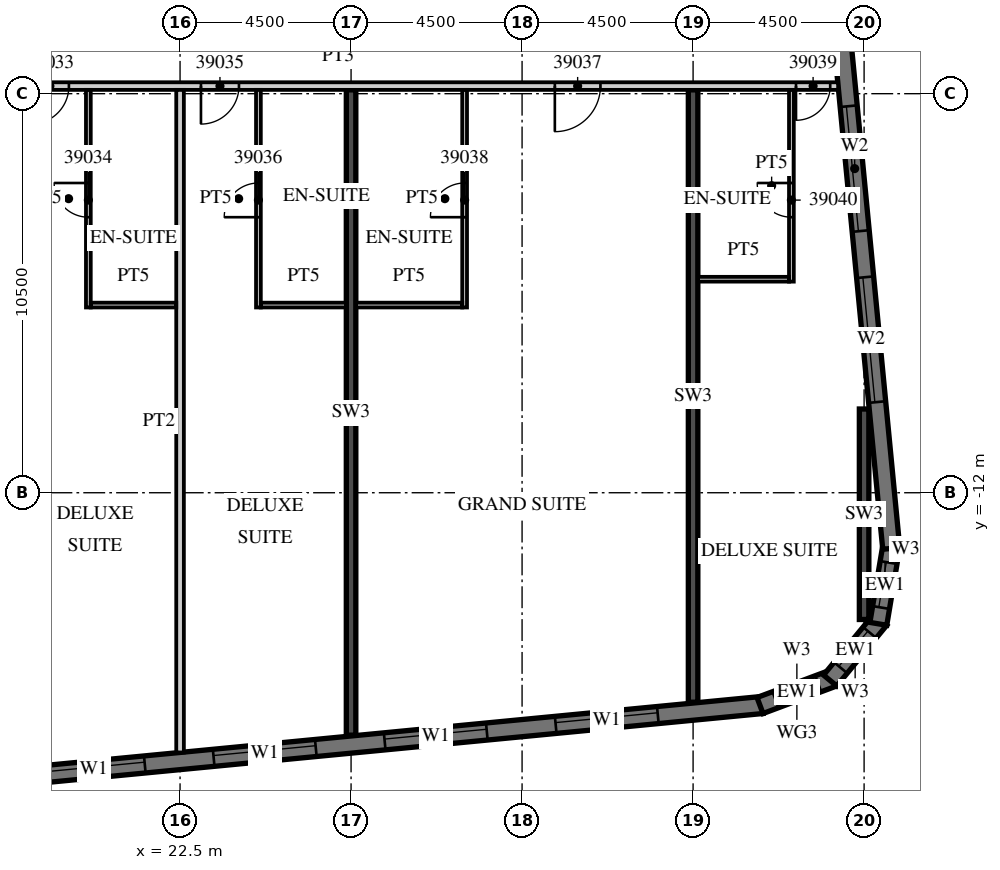
"""IFC4 building model, lengths in metres.
Left out: names, types, materials, properties, quantities, classifications, styles, units other than length and angle.
Written with IfcOpenShell. Run it as: python <this file> out.ifc"""

import sys

from ifc_helpers import new_model, si_unit, direction, frame, frame_2d, origin, place, context, subcontext, project, spatial, polyline, rectangle, outline, extrude, element, fill, save


model = new_model("IFC4")
c1 = context("Model", 3, precision=1e-05, world=origin(), true_north=direction((0.0, 1.0)))
c2 = subcontext(c1, "Body", "Model", "MODEL_VIEW")
j1 = project(units=[si_unit("LENGTHUNIT", "METRE"), si_unit("PLANEANGLEUNIT", "RADIAN")], contexts=[c1])
p1 = place(None, origin())
s1 = spatial("IfcSite", under=j1, at=p1, CompositionType="ELEMENT")
p2 = place(p1, origin())
s2 = spatial("IfcBuilding", under=s1, at=p2, CompositionType="ELEMENT")
p3 = place(p2, frame((0.0, 0.0, 170.2)))
s3 = spatial("IfcBuildingStorey", under=s2, at=p3, CompositionType="ELEMENT", Elevation=170.2)
p4 = place(p3, frame((27.0, -18.379, 0.0), z_axis=(0.0, 0.0, 1.0), x_axis=(0.0, 1.0, 0.0)))
e1 = element("IfcWall", 1, at=p4, inside=s3, PredefinedType="SHEAR", context=c2, shape_type="SweptSolid", body=[
    extrude(rectangle(XDim=16.979, YDim=0.25, at=frame_2d((8.489, 0.0))), origin(), (0.0, 0.0, 1.0), 3.3),
])
p5 = place(p3, frame((36.0, -17.512, 0.0), z_axis=(0.0, 0.0, 1.0), x_axis=(0.0, 1.0, 0.0)))
e2 = element("IfcWall", 2, at=p5, inside=s3, PredefinedType="SHEAR", context=c2, shape_type="SweptSolid", body=[
    extrude(rectangle(XDim=16.112, YDim=0.25, at=frame_2d((8.056, 0.0))), origin(), (0.0, 0.0, 1.0), 3.3),
])
p6 = place(p3, frame((40.5, -15.335, 0.0), z_axis=(0.0, 0.0, 1.0), x_axis=(0.0, 1.0, 0.0)))
e3 = element("IfcWall", 3, at=p6, inside=s3, PredefinedType="SHEAR", context=c2, shape_type="SweptSolid", body=[
    extrude(rectangle(XDim=5.538, YDim=0.25, at=frame_2d((2.769, 0.0))), origin(), (0.0, 0.0, 1.0), 3.3),
])
p7 = place(p3, frame((-13.521, -22.529, 0.0), z_axis=(0.0, 0.0, 1.0), x_axis=(0.995396436651, 0.095843277819, 0.0)))
e4 = element("IfcWall", 4, at=p7, inside=s3, PredefinedType="SOLIDWALL", context=c2, shape_type="SweptSolid", body=[
    extrude(rectangle(XDim=51.578, YDim=0.45, at=frame_2d((25.789, 0.0))), origin(), (0.0, 0.0, 1.0), 3.02),
])
p8 = place(p7, frame((0.91, 0.0, 0.45)))
e5 = element("IfcOpeningElement", 5, at=p8, cuts=e4, PredefinedType="OPENING", context=c2, shape_type="SweptSolid", body=[
    extrude(rectangle(XDim=2.7, YDim=2.25, at=frame_2d((1.35, 1.125))), frame((0.0, 0.235, 0.0), z_axis=(0.0, -1.0, 0.0), x_axis=(1.0, 0.0, 0.0)), (0.0, 0.0, 1.0), 0.47),
])
p9 = place(p7, frame((5.431, 0.0, 0.45)))
e6 = element("IfcOpeningElement", 6, at=p9, cuts=e4, PredefinedType="OPENING", context=c2, shape_type="SweptSolid", body=[
    extrude(rectangle(XDim=2.7, YDim=2.25, at=frame_2d((1.35, 1.125))), frame((0.0, 0.235, 0.0), z_axis=(0.0, -1.0, 0.0), x_axis=(1.0, 0.0, 0.0)), (0.0, 0.0, 1.0), 0.47),
])
p10 = place(p7, frame((9.952, 0.0, 0.45)))
e7 = element("IfcOpeningElement", 7, at=p10, cuts=e4, PredefinedType="OPENING", context=c2, shape_type="SweptSolid", body=[
    extrude(rectangle(XDim=2.7, YDim=2.25, at=frame_2d((1.35, 1.125))), frame((0.0, 0.235, 0.0), z_axis=(0.0, -1.0, 0.0), x_axis=(1.0, 0.0, 0.0)), (0.0, 0.0, 1.0), 0.47),
])
p11 = place(p7, frame((14.473, 0.0, 0.45)))
e8 = element("IfcOpeningElement", 8, at=p11, cuts=e4, PredefinedType="OPENING", context=c2, shape_type="SweptSolid", body=[
    extrude(rectangle(XDim=2.7, YDim=2.25, at=frame_2d((1.35, 1.125))), frame((0.0, 0.235, 0.0), z_axis=(0.0, -1.0, 0.0), x_axis=(1.0, 0.0, 0.0)), (0.0, 0.0, 1.0), 0.47),
])
p12 = place(p7, frame((18.994, 0.0, 0.45)))
e9 = element("IfcOpeningElement", 9, at=p12, cuts=e4, PredefinedType="OPENING", context=c2, shape_type="SweptSolid", body=[
    extrude(rectangle(XDim=2.7, YDim=2.25, at=frame_2d((1.35, 1.125))), frame((0.0, 0.235, 0.0), z_axis=(0.0, -1.0, 0.0), x_axis=(1.0, 0.0, 0.0)), (0.0, 0.0, 1.0), 0.47),
])
p13 = place(p7, frame((23.514, 0.0, 0.45)))
e10 = element("IfcOpeningElement", 10, at=p13, cuts=e4, PredefinedType="OPENING", context=c2, shape_type="SweptSolid", body=[
    extrude(rectangle(XDim=2.7, YDim=2.25, at=frame_2d((1.35, 1.125))), frame((0.0, 0.235, 0.0), z_axis=(0.0, -1.0, 0.0), x_axis=(1.0, 0.0, 0.0)), (0.0, 0.0, 1.0), 0.47),
])
p14 = place(p7, frame((28.035, 0.0, 0.45)))
e11 = element("IfcOpeningElement", 11, at=p14, cuts=e4, PredefinedType="OPENING", context=c2, shape_type="SweptSolid", body=[
    extrude(rectangle(XDim=2.7, YDim=2.25, at=frame_2d((1.35, 1.125))), frame((0.0, 0.235, 0.0), z_axis=(0.0, -1.0, 0.0), x_axis=(1.0, 0.0, 0.0)), (0.0, 0.0, 1.0), 0.47),
])
p15 = place(p7, frame((32.556, 0.0, 0.45)))
e12 = element("IfcOpeningElement", 12, at=p15, cuts=e4, PredefinedType="OPENING", context=c2, shape_type="SweptSolid", body=[
    extrude(rectangle(XDim=2.7, YDim=2.25, at=frame_2d((1.35, 1.125))), frame((0.0, 0.235, 0.0), z_axis=(0.0, -1.0, 0.0), x_axis=(1.0, 0.0, 0.0)), (0.0, 0.0, 1.0), 0.47),
])
p16 = place(p7, frame((37.077, 0.0, 0.45)))
e13 = element("IfcOpeningElement", 13, at=p16, cuts=e4, PredefinedType="OPENING", context=c2, shape_type="SweptSolid", body=[
    extrude(rectangle(XDim=2.7, YDim=2.25, at=frame_2d((1.35, 1.125))), frame((0.0, 0.235, 0.0), z_axis=(0.0, -1.0, 0.0), x_axis=(1.0, 0.0, 0.0)), (0.0, 0.0, 1.0), 0.47),
])
p17 = place(p7, frame((41.598, 0.0, 0.45)))
e14 = element("IfcOpeningElement", 14, at=p17, cuts=e4, PredefinedType="OPENING", context=c2, shape_type="SweptSolid", body=[
    extrude(rectangle(XDim=2.7, YDim=2.25, at=frame_2d((1.35, 1.125))), frame((0.0, 0.235, 0.0), z_axis=(0.0, -1.0, 0.0), x_axis=(1.0, 0.0, 0.0)), (0.0, 0.0, 1.0), 0.47),
])
p18 = place(p7, frame((46.119, 0.0, 0.45)))
e15 = element("IfcOpeningElement", 15, at=p18, cuts=e4, PredefinedType="OPENING", context=c2, shape_type="SweptSolid", body=[
    extrude(rectangle(XDim=2.7, YDim=2.25, at=frame_2d((1.35, 1.125))), frame((0.0, 0.235, 0.0), z_axis=(0.0, -1.0, 0.0), x_axis=(1.0, 0.0, 0.0)), (0.0, 0.0, 1.0), 0.47),
])
p19 = place(p3, frame((37.761, -17.598, 0.0), z_axis=(0.0, 0.0, 1.0), x_axis=(0.936677599948, 0.350192909346, 0.0)))
e16 = element("IfcWall", 16, at=p19, inside=s3, PredefinedType="SOLIDWALL", context=c2, shape_type="SweptSolid", body=[
    extrude(outline(polyline([(0.0, -0.225), (2.071, -0.225), (1.95, 0.225), (0.121, 0.225), (0.0, -0.225)])), origin(), (0.0, 0.0, 1.0), 3.02),
])
p20 = place(p19, frame((0.435, 0.0, 0.45)))
e17 = element("IfcOpeningElement", 17, at=p20, cuts=e16, PredefinedType="OPENING", context=c2, shape_type="SweptSolid", body=[
    extrude(rectangle(XDim=1.2, YDim=2.25, at=frame_2d((0.6, 1.125))), frame((0.0, 0.235, 0.0), z_axis=(0.0, -1.0, 0.0), x_axis=(1.0, 0.0, 0.0)), (0.0, 0.0, 1.0), 0.47),
])
p21 = place(p3, frame((39.606, -16.941, 0.0), z_axis=(0.0, 0.0, 1.0), x_axis=(0.636116318187, 0.771593176315, 0.0)))
e18 = element("IfcWall", 18, at=p21, inside=s3, PredefinedType="SOLIDWALL", context=c2, shape_type="SweptSolid", body=[
    extrude(outline(polyline([(0.0, -0.225), (2.071, -0.225), (1.95, 0.225), (0.121, 0.225), (0.0, -0.225)])), origin(), (0.0, 0.0, 1.0), 3.02),
])
p22 = place(p21, frame((0.435, 0.0, 0.45)))
e19 = element("IfcOpeningElement", 19, at=p22, cuts=e18, PredefinedType="OPENING", context=c2, shape_type="SweptSolid", body=[
    extrude(rectangle(XDim=1.2, YDim=2.25, at=frame_2d((0.6, 1.125))), frame((0.0, 0.235, 0.0), z_axis=(0.0, -1.0, 0.0), x_axis=(1.0, 0.0, 0.0)), (0.0, 0.0, 1.0), 0.47),
])
p23 = place(p3, frame((40.875, -15.449, 0.0), z_axis=(0.0, 0.0, 1.0), x_axis=(0.164953448126, 0.986301353518, 0.0)))
e20 = element("IfcWall", 20, at=p23, inside=s3, PredefinedType="SOLIDWALL", context=c2, shape_type="SweptSolid", body=[
    extrude(outline(polyline([(0.0, -0.225), (2.071, -0.225), (1.95, 0.225), (0.121, 0.225), (0.0, -0.225)])), origin(), (0.0, 0.0, 1.0), 3.02),
])
p24 = place(p23, frame((0.435, 0.0, 0.45)))
e21 = element("IfcOpeningElement", 21, at=p24, cuts=e20, PredefinedType="OPENING", context=c2, shape_type="SweptSolid", body=[
    extrude(rectangle(XDim=1.2, YDim=2.25, at=frame_2d((0.6, 1.125))), frame((0.0, 0.235, 0.0), z_axis=(0.0, -1.0, 0.0), x_axis=(1.0, 0.0, 0.0)), (0.0, 0.0, 1.0), 0.47),
])
p25 = place(p3, frame((41.214, -13.466, 0.0), z_axis=(0.0, 0.0, 1.0), x_axis=(-0.095847314626, 0.995396047952, 0.0)))
e22 = element("IfcWall", 22, at=p25, inside=s3, PredefinedType="SOLIDWALL", context=c2, shape_type="SweptSolid", body=[
    extrude(rectangle(XDim=34.0, YDim=0.45, at=frame_2d((17.0, 0.0))), origin(), (0.0, 0.0, 1.0), 3.02),
])
p26 = place(p25, frame((3.869, 0.0, 0.45)))
e23 = element("IfcOpeningElement", 23, at=p26, cuts=e22, PredefinedType="OPENING", context=c2, shape_type="SweptSolid", body=[
    extrude(rectangle(XDim=3.3, YDim=2.25, at=frame_2d((1.65, 1.125))), frame((0.0, 0.235, 0.0), z_axis=(0.0, -1.0, 0.0), x_axis=(1.0, 0.0, 0.0)), (0.0, 0.0, 1.0), 0.47),
])
p27 = place(p25, frame((8.39, 0.0, 0.45)))
e24 = element("IfcOpeningElement", 24, at=p27, cuts=e22, PredefinedType="OPENING", context=c2, shape_type="SweptSolid", body=[
    extrude(rectangle(XDim=3.3, YDim=2.25, at=frame_2d((1.65, 1.125))), frame((0.0, 0.235, 0.0), z_axis=(0.0, -1.0, 0.0), x_axis=(1.0, 0.0, 0.0)), (0.0, 0.0, 1.0), 0.47),
])
p28 = place(p3, frame((13.5, -1.3, 0.0), z_axis=(0.0, 0.0, 1.0), x_axis=(1.0, 0.0, 0.0)))
e25 = element("IfcWall", 25, at=p28, inside=s3, PredefinedType="PARTITIONING", context=c2, shape_type="SweptSolid", body=[
    extrude(rectangle(XDim=26.317, YDim=0.2, at=frame_2d((13.158, 0.0))), origin(), (0.0, 0.0, 1.0), 3.02),
])
p29 = place(p28, frame((2.925, 0.0, 0.0)))
e26 = element("IfcOpeningElement", 26, at=p29, cuts=e25, PredefinedType="OPENING", context=c2, shape_type="SweptSolid", body=[
    extrude(rectangle(XDim=1.0, YDim=2.1, at=frame_2d((0.5, 1.05))), frame((0.0, 0.11, 0.0), z_axis=(0.0, -1.0, 0.0), x_axis=(1.0, 0.0, 0.0)), (0.0, 0.0, 1.0), 0.22),
])
p30 = place(p28, frame((5.075, 0.0, 0.0)))
e27 = element("IfcOpeningElement", 27, at=p30, cuts=e25, PredefinedType="OPENING", context=c2, shape_type="SweptSolid", body=[
    extrude(rectangle(XDim=1.0, YDim=2.1, at=frame_2d((0.5, 1.05))), frame((0.0, 0.11, 0.0), z_axis=(0.0, -1.0, 0.0), x_axis=(1.0, 0.0, 0.0)), (0.0, 0.0, 1.0), 0.22),
])
p31 = place(p28, frame((9.55, 0.0, 0.0)))
e28 = element("IfcOpeningElement", 28, at=p31, cuts=e25, PredefinedType="OPENING", context=c2, shape_type="SweptSolid", body=[
    extrude(rectangle(XDim=1.0, YDim=2.1, at=frame_2d((0.5, 1.05))), frame((0.0, 0.11, 0.0), z_axis=(0.0, -1.0, 0.0), x_axis=(1.0, 0.0, 0.0)), (0.0, 0.0, 1.0), 0.22),
])
p32 = place(p28, frame((18.862, 0.0, 0.0)))
e29 = element("IfcOpeningElement", 29, at=p32, cuts=e25, PredefinedType="OPENING", context=c2, shape_type="SweptSolid", body=[
    extrude(rectangle(XDim=1.2, YDim=2.1, at=frame_2d((0.6, 1.05))), frame((0.0, 0.11, 0.0), z_axis=(0.0, -1.0, 0.0), x_axis=(1.0, 0.0, 0.0)), (0.0, 0.0, 1.0), 0.22),
])
p33 = place(p28, frame((25.208, 0.0, 0.0)))
e30 = element("IfcOpeningElement", 30, at=p33, cuts=e25, PredefinedType="OPENING", context=c2, shape_type="SweptSolid", body=[
    extrude(rectangle(XDim=0.9, YDim=2.1, at=frame_2d((0.45, 1.05))), frame((0.0, 0.11, 0.0), z_axis=(0.0, -1.0, 0.0), x_axis=(1.0, 0.0, 0.0)), (0.0, 0.0, 1.0), 0.22),
])
p34 = place(p3, frame((22.5, -18.834, 0.0), z_axis=(0.0, 0.0, 1.0), x_axis=(0.0, 1.0, 0.0)))
e31 = element("IfcWall", 31, at=p34, inside=s3, PredefinedType="PARTITIONING", context=c2, shape_type="SweptSolid", body=[
    extrude(rectangle(XDim=17.434, YDim=0.2, at=frame_2d((8.717, 0.0))), origin(), (0.0, 0.0, 1.0), 3.02),
])
p35 = place(p3, frame((20.087, -7.125, 0.0), z_axis=(0.0, 0.0, 1.0), x_axis=(0.0, 1.0, 0.0)))
e32 = element("IfcWall", 32, at=p35, inside=s3, PredefinedType="PARTITIONING", context=c2, shape_type="SweptSolid", body=[
    extrude(rectangle(XDim=5.725, YDim=0.125, at=frame_2d((2.863, 0.0))), origin(), (0.0, 0.0, 1.0), 3.02),
])
p36 = place(p35, frame((2.375, 0.0, 0.0)))
e33 = element("IfcOpeningElement", 33, at=p36, cuts=e32, PredefinedType="OPENING", context=c2, shape_type="SweptSolid", body=[
    extrude(rectangle(XDim=0.9, YDim=2.1, at=frame_2d((0.45, 1.05))), frame((0.0, 0.073, 0.0), z_axis=(0.0, -1.0, 0.0), x_axis=(1.0, 0.0, 0.0)), (0.0, 0.0, 1.0), 0.145),
])
p37 = place(p3, frame((20.15, -7.062, 0.0), z_axis=(0.0, 0.0, 1.0), x_axis=(1.0, 0.0, 0.0)))
e34 = element("IfcWall", 34, at=p37, inside=s3, PredefinedType="PARTITIONING", context=c2, shape_type="SweptSolid", body=[
    extrude(rectangle(XDim=2.25, YDim=0.125, at=frame_2d((1.125, 0.0))), origin(), (0.0, 0.0, 1.0), 3.02),
])
p38 = place(p3, frame((24.562, -7.125, 0.0), z_axis=(0.0, 0.0, 1.0), x_axis=(0.0, 1.0, 0.0)))
e35 = element("IfcWall", 35, at=p38, inside=s3, PredefinedType="PARTITIONING", context=c2, shape_type="SweptSolid", body=[
    extrude(rectangle(XDim=5.725, YDim=0.125, at=frame_2d((2.863, 0.0))), origin(), (0.0, 0.0, 1.0), 3.02),
])
p39 = place(p38, frame((2.375, 0.0, 0.0)))
e36 = element("IfcOpeningElement", 36, at=p39, cuts=e35, PredefinedType="OPENING", context=c2, shape_type="SweptSolid", body=[
    extrude(rectangle(XDim=0.9, YDim=2.1, at=frame_2d((0.45, 1.05))), frame((0.0, 0.073, 0.0), z_axis=(0.0, -1.0, 0.0), x_axis=(1.0, 0.0, 0.0)), (0.0, 0.0, 1.0), 0.145),
])
p40 = place(p3, frame((24.625, -7.062, 0.0), z_axis=(0.0, 0.0, 1.0), x_axis=(1.0, 0.0, 0.0)))
e37 = element("IfcWall", 37, at=p40, inside=s3, PredefinedType="PARTITIONING", context=c2, shape_type="SweptSolid", body=[
    extrude(rectangle(XDim=2.25, YDim=0.125, at=frame_2d((1.125, 0.0))), origin(), (0.0, 0.0, 1.0), 3.02),
])
p41 = place(p3, frame((29.988, -7.125, 0.0), z_axis=(0.0, 0.0, 1.0), x_axis=(0.0, 1.0, 0.0)))
e38 = element("IfcWall", 38, at=p41, inside=s3, PredefinedType="PARTITIONING", context=c2, shape_type="SweptSolid", body=[
    extrude(rectangle(XDim=5.725, YDim=0.125, at=frame_2d((2.863, 0.0))), origin(), (0.0, 0.0, 1.0), 3.02),
])
p42 = place(p41, frame((2.375, 0.0, 0.0)))
e39 = element("IfcOpeningElement", 39, at=p42, cuts=e38, PredefinedType="OPENING", context=c2, shape_type="SweptSolid", body=[
    extrude(rectangle(XDim=0.9, YDim=2.1, at=frame_2d((0.45, 1.05))), frame((0.0, 0.073, 0.0), z_axis=(0.0, -1.0, 0.0), x_axis=(1.0, 0.0, 0.0)), (0.0, 0.0, 1.0), 0.145),
])
p43 = place(p3, frame((27.125, -7.062, 0.0), z_axis=(0.0, 0.0, 1.0), x_axis=(1.0, 0.0, 0.0)))
e40 = element("IfcWall", 40, at=p43, inside=s3, PredefinedType="PARTITIONING", context=c2, shape_type="SweptSolid", body=[
    extrude(rectangle(XDim=2.8, YDim=0.125, at=frame_2d((1.4, 0.0))), origin(), (0.0, 0.0, 1.0), 3.02),
])
p44 = place(p3, frame((38.587, -6.445, 0.0), z_axis=(0.0, 0.0, 1.0), x_axis=(0.0, 1.0, 0.0)))
e41 = element("IfcWall", 41, at=p44, inside=s3, PredefinedType="PARTITIONING", context=c2, shape_type="SweptSolid", body=[
    extrude(rectangle(XDim=5.045, YDim=0.125, at=frame_2d((2.522, 0.0))), origin(), (0.0, 0.0, 1.0), 3.02),
])
p45 = place(p44, frame((1.695, 0.0, 0.0)))
e42 = element("IfcOpeningElement", 42, at=p45, cuts=e41, PredefinedType="OPENING", context=c2, shape_type="SweptSolid", body=[
    extrude(rectangle(XDim=0.9, YDim=2.1, at=frame_2d((0.45, 1.05))), frame((0.0, 0.073, 0.0), z_axis=(0.0, -1.0, 0.0), x_axis=(1.0, 0.0, 0.0)), (0.0, 0.0, 1.0), 0.145),
])
p46 = place(p3, frame((36.125, -6.382, 0.0), z_axis=(0.0, 0.0, 1.0), x_axis=(1.0, 0.0, 0.0)))
e43 = element("IfcWall", 43, at=p46, inside=s3, PredefinedType="PARTITIONING", context=c2, shape_type="SweptSolid", body=[
    extrude(rectangle(XDim=2.4, YDim=0.125, at=frame_2d((1.2, 0.0))), origin(), (0.0, 0.0, 1.0), 3.02),
])
p47 = place(p15, origin())
e44 = element("IfcWindow", 44, at=p47, inside=s3, PartitioningType="SINGLE_PANEL", PredefinedType="WINDOW", context=c2, shape_type="SweptSolid", body=[
    extrude(rectangle(XDim=2.7, YDim=2.25, at=frame_2d((1.35, 1.125))), frame((0.0, 0.09, 0.0), z_axis=(0.0, -1.0, 0.0), x_axis=(1.0, 0.0, 0.0)), (0.0, 0.0, 1.0), 0.06),
])
fill(e12, e44)
p48 = place(p16, origin())
e45 = element("IfcWindow", 45, at=p48, inside=s3, PartitioningType="SINGLE_PANEL", PredefinedType="WINDOW", context=c2, shape_type="SweptSolid", body=[
    extrude(rectangle(XDim=2.7, YDim=2.25, at=frame_2d((1.35, 1.125))), frame((0.0, 0.09, 0.0), z_axis=(0.0, -1.0, 0.0), x_axis=(1.0, 0.0, 0.0)), (0.0, 0.0, 1.0), 0.06),
])
fill(e13, e45)
p49 = place(p17, origin())
e46 = element("IfcWindow", 46, at=p49, inside=s3, PartitioningType="SINGLE_PANEL", PredefinedType="WINDOW", context=c2, shape_type="SweptSolid", body=[
    extrude(rectangle(XDim=2.7, YDim=2.25, at=frame_2d((1.35, 1.125))), frame((0.0, 0.09, 0.0), z_axis=(0.0, -1.0, 0.0), x_axis=(1.0, 0.0, 0.0)), (0.0, 0.0, 1.0), 0.06),
])
fill(e14, e46)
p50 = place(p18, origin())
e47 = element("IfcWindow", 47, at=p50, inside=s3, PartitioningType="SINGLE_PANEL", PredefinedType="WINDOW", context=c2, shape_type="SweptSolid", body=[
    extrude(rectangle(XDim=2.7, YDim=2.25, at=frame_2d((1.35, 1.125))), frame((0.0, 0.09, 0.0), z_axis=(0.0, -1.0, 0.0), x_axis=(1.0, 0.0, 0.0)), (0.0, 0.0, 1.0), 0.06),
])
fill(e15, e47)
p51 = place(p20, origin())
e48 = element("IfcWindow", 48, at=p51, inside=s3, PartitioningType="SINGLE_PANEL", PredefinedType="WINDOW", context=c2, shape_type="SweptSolid", body=[
    extrude(rectangle(XDim=1.2, YDim=2.25, at=frame_2d((0.6, 1.125))), frame((0.0, 0.09, 0.0), z_axis=(0.0, -1.0, 0.0), x_axis=(1.0, 0.0, 0.0)), (0.0, 0.0, 1.0), 0.06),
])
fill(e17, e48)
p52 = place(p22, origin())
e49 = element("IfcWindow", 49, at=p52, inside=s3, PartitioningType="SINGLE_PANEL", PredefinedType="WINDOW", context=c2, shape_type="SweptSolid", body=[
    extrude(rectangle(XDim=1.2, YDim=2.25, at=frame_2d((0.6, 1.125))), frame((0.0, 0.09, 0.0), z_axis=(0.0, -1.0, 0.0), x_axis=(1.0, 0.0, 0.0)), (0.0, 0.0, 1.0), 0.06),
])
fill(e19, e49)
p53 = place(p24, origin())
e50 = element("IfcWindow", 50, at=p53, inside=s3, PartitioningType="SINGLE_PANEL", PredefinedType="WINDOW", context=c2, shape_type="SweptSolid", body=[
    extrude(rectangle(XDim=1.2, YDim=2.25, at=frame_2d((0.6, 1.125))), frame((0.0, 0.09, 0.0), z_axis=(0.0, -1.0, 0.0), x_axis=(1.0, 0.0, 0.0)), (0.0, 0.0, 1.0), 0.06),
])
fill(e21, e50)
p54 = place(p26, origin())
e51 = element("IfcWindow", 51, at=p54, inside=s3, PartitioningType="SINGLE_PANEL", PredefinedType="WINDOW", context=c2, shape_type="SweptSolid", body=[
    extrude(rectangle(XDim=3.3, YDim=2.25, at=frame_2d((1.65, 1.125))), frame((0.0, 0.09, 0.0), z_axis=(0.0, -1.0, 0.0), x_axis=(1.0, 0.0, 0.0)), (0.0, 0.0, 1.0), 0.06),
])
fill(e23, e51)
p55 = place(p27, origin())
e52 = element("IfcWindow", 52, at=p55, inside=s3, PartitioningType="SINGLE_PANEL", PredefinedType="WINDOW", context=c2, shape_type="SweptSolid", body=[
    extrude(rectangle(XDim=3.3, YDim=2.25, at=frame_2d((1.65, 1.125))), frame((0.0, 0.09, 0.0), z_axis=(0.0, -1.0, 0.0), x_axis=(1.0, 0.0, 0.0)), (0.0, 0.0, 1.0), 0.06),
])
fill(e24, e52)
p56 = place(p30, origin())
e53 = element("IfcDoor", 53, at=p56, inside=s3, OperationType="SINGLE_SWING_LEFT", PredefinedType="DOOR", context=c2, shape_type="SweptSolid", body=[
    extrude(rectangle(XDim=1.0, YDim=2.1, at=frame_2d((0.5, 1.05))), frame((0.0, 0.025, 0.0), z_axis=(0.0, -1.0, 0.0), x_axis=(1.0, 0.0, 0.0)), (0.0, 0.0, 1.0), 0.05),
])
fill(e27, e53)
p57 = place(p36, origin())
e54 = element("IfcDoor", 54, at=p57, inside=s3, OperationType="SINGLE_SWING_RIGHT", PredefinedType="DOOR", context=c2, shape_type="SweptSolid", body=[
    extrude(rectangle(XDim=0.9, YDim=2.1, at=frame_2d((0.45, 1.05))), frame((0.0, 0.025, 0.0), z_axis=(0.0, -1.0, 0.0), x_axis=(1.0, 0.0, 0.0)), (0.0, 0.0, 1.0), 0.05),
])
fill(e33, e54)
p58 = place(p31, origin())
e55 = element("IfcDoor", 55, at=p58, inside=s3, OperationType="SINGLE_SWING_LEFT", PredefinedType="DOOR", context=c2, shape_type="SweptSolid", body=[
    extrude(rectangle(XDim=1.0, YDim=2.1, at=frame_2d((0.5, 1.05))), frame((0.0, 0.025, 0.0), z_axis=(0.0, -1.0, 0.0), x_axis=(1.0, 0.0, 0.0)), (0.0, 0.0, 1.0), 0.05),
])
fill(e28, e55)
p59 = place(p39, origin())
e56 = element("IfcDoor", 56, at=p59, inside=s3, OperationType="SINGLE_SWING_LEFT", PredefinedType="DOOR", context=c2, shape_type="SweptSolid", body=[
    extrude(rectangle(XDim=0.9, YDim=2.1, at=frame_2d((0.45, 1.05))), frame((0.0, 0.025, 0.0), z_axis=(0.0, -1.0, 0.0), x_axis=(1.0, 0.0, 0.0)), (0.0, 0.0, 1.0), 0.05),
])
fill(e36, e56)
p60 = place(p32, origin())
e57 = element("IfcDoor", 57, at=p60, inside=s3, OperationType="SINGLE_SWING_LEFT", PredefinedType="DOOR", context=c2, shape_type="SweptSolid", body=[
    extrude(rectangle(XDim=1.2, YDim=2.1, at=frame_2d((0.6, 1.05))), frame((0.0, 0.025, 0.0), z_axis=(0.0, -1.0, 0.0), x_axis=(1.0, 0.0, 0.0)), (0.0, 0.0, 1.0), 0.05),
])
fill(e29, e57)
p61 = place(p42, origin())
e58 = element("IfcDoor", 58, at=p61, inside=s3, OperationType="SINGLE_SWING_LEFT", PredefinedType="DOOR", context=c2, shape_type="SweptSolid", body=[
    extrude(rectangle(XDim=0.9, YDim=2.1, at=frame_2d((0.45, 1.05))), frame((0.0, 0.025, 0.0), z_axis=(0.0, -1.0, 0.0), x_axis=(1.0, 0.0, 0.0)), (0.0, 0.0, 1.0), 0.05),
])
fill(e39, e58)
p62 = place(p33, origin())
e59 = element("IfcDoor", 59, at=p62, inside=s3, OperationType="SINGLE_SWING_LEFT", PredefinedType="DOOR", context=c2, shape_type="SweptSolid", body=[
    extrude(rectangle(XDim=0.9, YDim=2.1, at=frame_2d((0.45, 1.05))), frame((0.0, 0.025, 0.0), z_axis=(0.0, -1.0, 0.0), x_axis=(1.0, 0.0, 0.0)), (0.0, 0.0, 1.0), 0.05),
])
fill(e30, e59)
p63 = place(p45, origin())
e60 = element("IfcDoor", 60, at=p63, inside=s3, OperationType="SINGLE_SWING_RIGHT", PredefinedType="DOOR", context=c2, shape_type="SweptSolid", body=[
    extrude(rectangle(XDim=0.9, YDim=2.1, at=frame_2d((0.45, 1.05))), frame((0.0, 0.025, 0.0), z_axis=(0.0, -1.0, 0.0), x_axis=(1.0, 0.0, 0.0)), (0.0, 0.0, 1.0), 0.05),
])
fill(e42, e60)
save(model, sys.argv[1])
